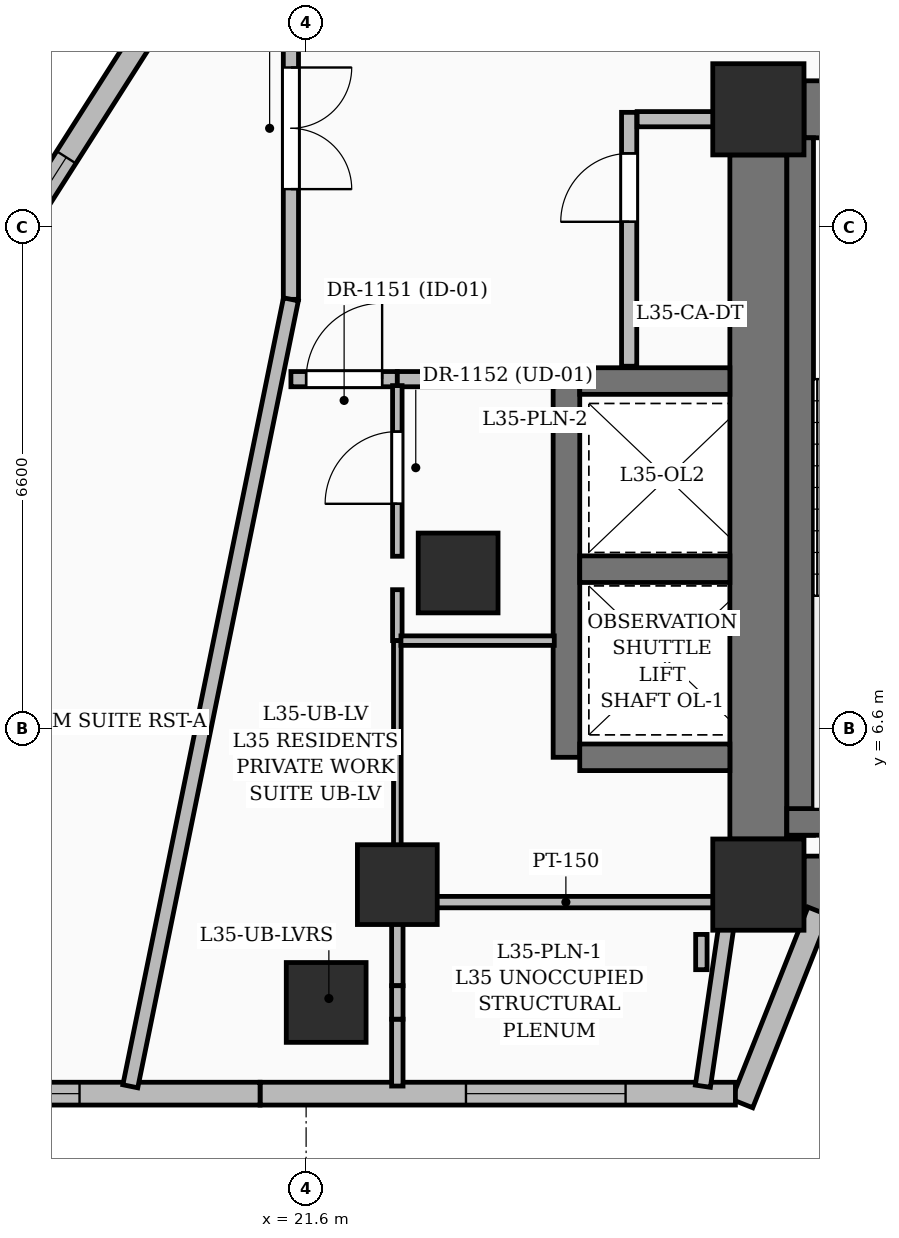
"""IFC4 building model, lengths in metres.
Left out: names, types, materials, properties, quantities, classifications, styles, units other than length and angle.
Written with IfcOpenShell. Run it as: python <this file> out.ifc"""

import sys

from ifc_helpers import new_model, si_unit, direction, frame, frame_2d, origin, origin_2d, place, context, subcontext, project, spatial, rectangle, extrude, element, fill, save


model = new_model("IFC4")
c1 = context("Model", 3, precision=1e-05, world=origin(), true_north=direction((0.0, 1.0)))
c2 = subcontext(c1, "Body", "Model", "MODEL_VIEW")
j1 = project(units=[si_unit("LENGTHUNIT", "METRE"), si_unit("PLANEANGLEUNIT", "RADIAN")], contexts=[c1])
p1 = place(None, origin())
s1 = spatial("IfcSite", under=j1, at=p1, CompositionType="ELEMENT")
p2 = place(p1, origin())
s2 = spatial("IfcBuilding", under=s1, at=p2, CompositionType="ELEMENT")
p3 = place(p2, frame((0.0, 0.0, 139.2)))
s3 = spatial("IfcBuildingStorey", under=s2, at=p3, CompositionType="ELEMENT", Elevation=139.2)
for number, where, z_axis, x_axis in (
    (1, (27.55, 4.55, 0.0), (0.0, 0.0, 1.0), (1.0, 0.0, 0.0)),
    (2, (27.55, 14.75, 0.0), (0.0, 0.0, 1.0), (1.0, 0.0, 0.0)),
):
    element("IfcColumn", number, at=place(p3, frame(where, z_axis=z_axis, x_axis=x_axis)), inside=s3, PredefinedType="COLUMN", context=c2, shape_type="SweptSolid", body=[
        extrude(rectangle(XDim=1.2, YDim=1.2, at=origin_2d()), origin(), (0.0, 0.0, 1.0), 3.6),
    ])
for number, where, z_axis, x_axis in (
    (3, (22.8, 4.55, 0.0), (0.0, 0.0, 1.0), (1.0, 0.0, 0.0)),
    (4, (23.6, 8.65, 0.0), (0.0, 0.0, 1.0), (1.0, 0.0, 0.0)),
):
    element("IfcColumn", number, at=place(p3, frame(where, z_axis=z_axis, x_axis=x_axis)), inside=s3, PredefinedType="COLUMN", context=c2, shape_type="SweptSolid", body=[
        extrude(rectangle(XDim=1.05, YDim=1.05, at=origin_2d()), origin(), (0.0, 0.0, 1.0), 3.6),
    ])
p4 = place(p3, frame((28.15, 4.55, 0.0), z_axis=(0.0, 0.0, 1.0), x_axis=(1.0, 0.0, 0.0)))
e5 = element("IfcWall", 5, at=p4, inside=s3, PredefinedType="SHEAR", context=c2, shape_type="SweptSolid", body=[
    extrude(rectangle(XDim=6.4, YDim=0.75, at=frame_2d((3.2, 0.0))), origin(), (0.0, 0.0, 1.0), 3.6),
])
p5 = place(p3, frame((28.15, 14.75, 0.0), z_axis=(0.0, 0.0, 1.0), x_axis=(1.0, 0.0, 0.0)))
e6 = element("IfcWall", 6, at=p5, inside=s3, PredefinedType="SHEAR", context=c2, shape_type="SweptSolid", body=[
    extrude(rectangle(XDim=6.4, YDim=0.75, at=frame_2d((3.2, 0.0))), origin(), (0.0, 0.0, 1.0), 3.6),
])
p6 = place(p5, frame((1.025, 0.0, 0.0)))
e7 = element("IfcOpeningElement", 7, at=p6, cuts=e6, PredefinedType="OPENING", context=c2, shape_type="SweptSolid", body=[
    extrude(rectangle(XDim=1.05, YDim=2.15, at=frame_2d((0.525, 1.075))), frame((0.0, 0.385, 0.0), z_axis=(0.0, -1.0, 0.0), x_axis=(1.0, 0.0, 0.0)), (0.0, 0.0, 1.0), 0.77),
])
p7 = place(p5, frame((3.8, 0.0, 0.0)))
e8 = element("IfcOpeningElement", 8, at=p7, cuts=e6, PredefinedType="OPENING", context=c2, shape_type="SweptSolid", body=[
    extrude(rectangle(XDim=1.1, YDim=2.2, at=frame_2d((0.55, 1.1))), frame((0.0, 0.385, 0.0), z_axis=(0.0, -1.0, 0.0), x_axis=(1.0, 0.0, 0.0)), (0.0, 0.0, 1.0), 0.77),
])
p8 = place(p3, frame((27.55, 5.15, 0.0), z_axis=(0.0, 0.0, 1.0), x_axis=(0.0, 1.0, 0.0)))
e9 = element("IfcWall", 9, at=p8, inside=s3, PredefinedType="SHEAR", context=c2, shape_type="SweptSolid", body=[
    extrude(rectangle(XDim=9.0, YDim=0.75, at=frame_2d((4.5, 0.0))), origin(), (0.0, 0.0, 1.0), 3.6),
])
p9 = place(p3, frame((28.1, 5.2, 0.0), z_axis=(0.0, 0.0, 1.0), x_axis=(0.0, 1.0, 0.0)))
e10 = element("IfcWall", 10, at=p9, inside=s3, PredefinedType="SOLIDWALL", context=c2, shape_type="SweptSolid", body=[
    extrude(rectangle(XDim=9.175, YDim=0.35, at=frame_2d((4.587, 0.0))), origin(), (0.0, 0.0, 1.0), 3.6),
])
p10 = place(p3, frame((27.925, 5.375, 0.0), z_axis=(0.0, 0.0, 1.0), x_axis=(1.0, 0.0, 0.0)))
e11 = element("IfcWall", 11, at=p10, inside=s3, PredefinedType="SOLIDWALL", context=c2, shape_type="SweptSolid", body=[
    extrude(rectangle(XDim=3.55, YDim=0.35, at=frame_2d((1.775, 0.0))), origin(), (0.0, 0.0, 1.0), 3.6),
])
p11 = place(p3, frame((25.025, 6.225, 0.0), z_axis=(0.0, 0.0, 1.0), x_axis=(0.0, 1.0, 0.0)))
e12 = element("IfcWall", 12, at=p11, inside=s3, PredefinedType="SOLIDWALL", context=c2, shape_type="SweptSolid", body=[
    extrude(rectangle(XDim=4.95, YDim=0.35, at=frame_2d((2.475, 0.0))), origin(), (0.0, 0.0, 1.0), 3.6),
])
for number, where, z_axis, x_axis in (
    (13, (25.2, 6.225, 0.0), (0.0, 0.0, 1.0), (1.0, 0.0, 0.0)),
    (14, (25.2, 8.7, 0.0), (0.0, 0.0, 1.0), (1.0, 0.0, 0.0)),
    (15, (25.2, 11.175, 0.0), (0.0, 0.0, 1.0), (1.0, 0.0, 0.0)),
):
    element("IfcWall", number, at=place(p3, frame(where, z_axis=z_axis, x_axis=x_axis)), inside=s3, PredefinedType="SOLIDWALL", context=c2, shape_type="SweptSolid", body=[
        extrude(rectangle(XDim=1.975, YDim=0.35, at=frame_2d((0.988, 0.0))), origin(), (0.0, 0.0, 1.0), 3.6),
    ])
p12 = place(p3, frame((21.864, 3.0, 0.0), z_axis=(0.0, 0.0, 1.0), x_axis=(1.0, 0.0, 0.0)))
e16 = element("IfcColumn", 16, at=p12, inside=s3, PredefinedType="COLUMN", context=c2, shape_type="SweptSolid", body=[
    extrude(rectangle(XDim=1.05, YDim=1.05, at=origin_2d()), origin(), (0.0, 0.0, 1.0), 3.6),
])
p13 = place(p3, frame((28.342, 4.199, 0.0), z_axis=(0.0, 0.0, 1.0), x_axis=(-0.36956502288, -0.929204871847, 0.0)))
e17 = element("IfcWall", 17, at=p13, inside=s3, PredefinedType="SOLIDWALL", context=c2, shape_type="SweptSolid", body=[
    extrude(rectangle(XDim=2.722, YDim=0.3, at=frame_2d((1.361, 0.0))), origin(), (0.0, 0.0, 1.0), 2.575),
])
p14 = place(p3, frame((27.248, 1.8, 0.0), z_axis=(0.0, 0.0, 1.0), x_axis=(-1.0, 0.0, 0.0)))
e18 = element("IfcWall", 18, at=p14, inside=s3, PredefinedType="SOLIDWALL", context=c2, shape_type="SweptSolid", body=[
    extrude(rectangle(XDim=6.254, YDim=0.3, at=frame_2d((3.127, 0.0))), origin(), (0.0, 0.0, 1.0), 3.35),
])
p15 = place(p14, frame((1.445, 0.0, 0.55)))
e19 = element("IfcOpeningElement", 19, at=p15, cuts=e18, PredefinedType="OPENING", context=c2, shape_type="SweptSolid", body=[
    extrude(rectangle(XDim=2.1, YDim=2.4, at=frame_2d((1.05, 1.2))), frame((0.0, 0.16, 0.0), z_axis=(0.0, -1.0, 0.0), x_axis=(1.0, 0.0, 0.0)), (0.0, 0.0, 1.0), 0.32),
])
p16 = place(p3, frame((20.994, 1.8, 0.0), z_axis=(0.0, 0.0, 1.0), x_axis=(-1.0, 0.0, 0.0)))
e20 = element("IfcWall", 20, at=p16, inside=s3, PredefinedType="SOLIDWALL", context=c2, shape_type="SweptSolid", body=[
    extrude(rectangle(XDim=6.534, YDim=0.3, at=frame_2d((3.267, 0.0))), origin(), (0.0, 0.0, 1.0), 3.35),
])
p17 = place(p16, frame((2.375, 0.0, 0.6)))
e21 = element("IfcOpeningElement", 21, at=p17, cuts=e20, PredefinedType="OPENING", context=c2, shape_type="SweptSolid", body=[
    extrude(rectangle(XDim=1.8, YDim=2.1, at=frame_2d((0.9, 1.05))), frame((0.0, 0.16, 0.0), z_axis=(0.0, -1.0, 0.0), x_axis=(1.0, 0.0, 0.0)), (0.0, 0.0, 1.0), 0.32),
])
p18 = place(p3, frame((16.202, 10.597, 0.0), z_axis=(0.0, 0.0, 1.0), x_axis=(0.537115953095, 0.843508419004, 0.0)))
e22 = element("IfcWall", 22, at=p18, inside=s3, PredefinedType="SOLIDWALL", context=c2, shape_type="SweptSolid", body=[
    extrude(rectangle(XDim=6.569, YDim=0.3, at=frame_2d((3.285, 0.0))), origin(), (0.0, 0.0, 1.0), 3.35),
])
p19 = place(p18, frame((2.375, 0.0, 0.6)))
e23 = element("IfcOpeningElement", 23, at=p19, cuts=e22, PredefinedType="OPENING", context=c2, shape_type="SweptSolid", body=[
    extrude(rectangle(XDim=1.8, YDim=2.1, at=frame_2d((0.9, 1.05))), frame((0.0, 0.16, 0.0), z_axis=(0.0, -1.0, 0.0), x_axis=(1.0, 0.0, 0.0)), (0.0, 0.0, 1.0), 0.32),
])
p20 = place(p3, frame((25.85, 11.37, 0.0), z_axis=(0.0, 0.0, 1.0), x_axis=(0.0, 1.0, 0.0)))
e24 = element("IfcWall", 24, at=p20, inside=s3, PredefinedType="PARTITIONING", context=c2, shape_type="SweptSolid", body=[
    extrude(rectangle(XDim=3.34, YDim=0.2, at=frame_2d((1.67, 0.0))), origin(), (0.0, 0.0, 1.0), 3.35),
])
p21 = place(p20, frame((1.9, 0.0, 0.0)))
e25 = element("IfcOpeningElement", 25, at=p21, cuts=e24, PredefinedType="OPENING", context=c2, shape_type="SweptSolid", body=[
    extrude(rectangle(XDim=0.9, YDim=2.1, at=frame_2d((0.45, 1.05))), frame((0.0, 0.11, 0.0), z_axis=(0.0, -1.0, 0.0), x_axis=(1.0, 0.0, 0.0)), (0.0, 0.0, 1.0), 0.22),
])
p22 = place(p3, frame((25.955, 14.62, 0.0), z_axis=(0.0, 0.0, 1.0), x_axis=(1.0, 0.0, 0.0)))
e26 = element("IfcWall", 26, at=p22, inside=s3, PredefinedType="PARTITIONING", context=c2, shape_type="SweptSolid", body=[
    extrude(rectangle(XDim=1.205, YDim=0.2, at=frame_2d((0.603, 0.0))), origin(), (0.0, 0.0, 1.0), 3.35),
])
p23 = place(p3, frame((21.4, 16.75, 0.0), z_axis=(0.0, 0.0, 1.0), x_axis=(0.0, -1.0, 0.0)))
e27 = element("IfcWall", 27, at=p23, inside=s3, PredefinedType="PARTITIONING", context=c2, shape_type="SweptSolid", body=[
    extrude(rectangle(XDim=4.5, YDim=0.2, at=frame_2d((2.25, 0.0))), origin(), (0.0, 0.0, 1.0), 2.57),
])
p24 = place(p23, frame((1.45, 0.0, 0.0)))
e28 = element("IfcOpeningElement", 28, at=p24, cuts=e27, PredefinedType="OPENING", context=c2, shape_type="SweptSolid", body=[
    extrude(rectangle(XDim=1.6, YDim=2.3, at=frame_2d((0.8, 1.15))), frame((0.0, 0.11, 0.0), z_axis=(0.0, -1.0, 0.0), x_axis=(1.0, 0.0, 0.0)), (0.0, 0.0, 1.0), 0.22),
])
p25 = place(p3, frame((21.4, 11.2, 0.0), z_axis=(0.0, 0.0, 1.0), x_axis=(1.0, 0.0, 0.0)))
e29 = element("IfcWall", 29, at=p25, inside=s3, PredefinedType="PARTITIONING", context=c2, shape_type="SweptSolid", body=[
    extrude(rectangle(XDim=1.4, YDim=0.2, at=frame_2d((0.7, 0.0))), origin(), (0.0, 0.0, 1.0), 2.712),
])
p26 = place(p25, frame((0.2, 0.0, 0.0)))
e30 = element("IfcOpeningElement", 30, at=p26, cuts=e29, PredefinedType="OPENING", context=c2, shape_type="SweptSolid", body=[
    extrude(rectangle(XDim=1.0, YDim=2.2, at=frame_2d((0.5, 1.1))), frame((0.0, 0.11, 0.0), z_axis=(0.0, -1.0, 0.0), x_axis=(1.0, 0.0, 0.0)), (0.0, 0.0, 1.0), 0.22),
])
p27 = place(p3, frame((22.8, 11.2, 0.0), z_axis=(0.0, 0.0, 1.0), x_axis=(1.0, 0.0, 0.0)))
e31 = element("IfcWall", 31, at=p27, inside=s3, PredefinedType="PARTITIONING", context=c2, shape_type="SweptSolid", body=[
    extrude(rectangle(XDim=2.069, YDim=0.2, at=frame_2d((1.035, 0.0))), origin(), (0.0, 0.0, 1.0), 3.35),
])
p28 = place(p3, frame((19.287, 1.897, 0.0), z_axis=(0.0, 0.0, 1.0), x_axis=(0.19995367442, 0.979805352142, 0.0)))
e32 = element("IfcWall", 32, at=p28, inside=s3, PredefinedType="PARTITIONING", context=c2, shape_type="SweptSolid", body=[
    extrude(rectangle(XDim=10.566, YDim=0.2, at=frame_2d((5.283, 0.0))), origin(), (0.0, 0.0, 1.0), 2.393),
])
p29 = place(p3, frame((22.8, 1.9, 0.0), z_axis=(0.0, 0.0, 1.0), x_axis=(0.0, 1.0, 0.0)))
e33 = element("IfcWall", 33, at=p29, inside=s3, PredefinedType="PARTITIONING", context=c2, shape_type="SweptSolid", body=[
    extrude(rectangle(XDim=0.88, YDim=0.15, at=frame_2d((0.44, 0.0))), origin(), (0.0, 0.0, 1.0), 2.57),
])
p30 = place(p3, frame((22.8, 3.22, 0.0), z_axis=(0.0, 0.0, 1.0), x_axis=(0.0, 1.0, 0.0)))
e34 = element("IfcWall", 34, at=p30, inside=s3, PredefinedType="PARTITIONING", context=c2, shape_type="SweptSolid", body=[
    extrude(rectangle(XDim=1.1, YDim=0.15, at=frame_2d((0.55, 0.0))), origin(), (0.0, 0.0, 1.0), 2.57),
])
p31 = place(p3, frame((22.8, 7.76, 0.0), z_axis=(0.0, 0.0, 1.0), x_axis=(0.0, 1.0, 0.0)))
e35 = element("IfcWall", 35, at=p31, inside=s3, PredefinedType="PARTITIONING", context=c2, shape_type="SweptSolid", body=[
    extrude(rectangle(XDim=0.67, YDim=0.125, at=frame_2d((0.335, 0.0))), origin(), (0.0, 0.0, 1.0), 3.35),
])
p32 = place(p3, frame((22.8, 8.87, 0.0), z_axis=(0.0, 0.0, 1.0), x_axis=(0.0, 1.0, 0.0)))
e36 = element("IfcWall", 36, at=p32, inside=s3, PredefinedType="PARTITIONING", context=c2, shape_type="SweptSolid", body=[
    extrude(rectangle(XDim=2.245, YDim=0.125, at=frame_2d((1.123, 0.0))), origin(), (0.0, 0.0, 1.0), 2.393),
])
p33 = place(p32, frame((0.69, 0.0, 0.0)))
e37 = element("IfcOpeningElement", 37, at=p33, cuts=e36, PredefinedType="OPENING", context=c2, shape_type="SweptSolid", body=[
    extrude(rectangle(XDim=0.95, YDim=2.2, at=frame_2d((0.475, 1.1))), frame((0.0, 0.072, 0.0), z_axis=(0.0, -1.0, 0.0), x_axis=(1.0, 0.0, 0.0)), (0.0, 0.0, 1.0), 0.145),
])
p34 = place(p3, frame((22.8, 4.32, 0.0), z_axis=(0.0, 0.0, 1.0), x_axis=(0.0, 1.0, 0.0)))
e38 = element("IfcWall", 38, at=p34, inside=s3, PredefinedType="PARTITIONING", context=c2, shape_type="SweptSolid", body=[
    extrude(rectangle(XDim=3.44, YDim=0.1, at=frame_2d((1.72, 0.0))), origin(), (0.0, 0.0, 1.0), 3.35),
])
p35 = place(p3, frame((27.175, 4.32, 0.0), z_axis=(0.0, 0.0, 1.0), x_axis=(-1.0, 0.0, 0.0)))
e39 = element("IfcWall", 39, at=p35, inside=s3, PredefinedType="PARTITIONING", context=c2, shape_type="SweptSolid", body=[
    extrude(rectangle(XDim=4.315, YDim=0.15, at=frame_2d((2.157, 0.0))), origin(), (0.0, 0.0, 1.0), 2.436),
])
p36 = place(p3, frame((26.82, 1.898, 0.0), z_axis=(0.0, 0.0, 1.0), x_axis=(0.144970066801, 0.989436041254, 0.0)))
e40 = element("IfcWall", 40, at=p36, inside=s3, PredefinedType="PARTITIONING", context=c2, shape_type="SweptSolid", body=[
    extrude(rectangle(XDim=2.388, YDim=0.2, at=frame_2d((1.194, 0.0))), origin(), (0.0, 0.0, 1.0), 2.57),
])
p37 = place(p3, frame((22.847, 7.76, 0.0), z_axis=(0.0, 0.0, 1.0), x_axis=(1.0, 0.0, 0.0)))
e41 = element("IfcWall", 41, at=p37, inside=s3, PredefinedType="PARTITIONING", context=c2, shape_type="SweptSolid", body=[
    extrude(rectangle(XDim=2.018, YDim=0.125, at=frame_2d((1.009, 0.0))), origin(), (0.0, 0.0, 1.0), 3.35),
])
p38 = place(p3, frame((22.8, 3.22, 0.0), z_axis=(0.0, 0.0, 1.0), x_axis=(0.0, -1.0, 0.0)))
e42 = element("IfcWall", 42, at=p38, inside=s3, PredefinedType="PARTITIONING", context=c2, shape_type="SweptSolid", body=[
    extrude(rectangle(XDim=0.44, YDim=0.15, at=frame_2d((0.22, 0.0))), origin(), (0.0, 0.0, 1.0), 2.57),
])
p39 = place(p3, frame((26.8, 3.431, 0.0), z_axis=(0.0, 0.0, 1.0), x_axis=(0.0, 1.0, 0.0)))
e43 = element("IfcWall", 43, at=p39, inside=s3, PredefinedType="PARTITIONING", context=c2, shape_type="SweptSolid", body=[
    extrude(rectangle(XDim=0.464, YDim=0.15, at=frame_2d((0.232, 0.0))), origin(), (0.0, 0.0, 1.0), 3.35),
])
p40 = place(p15, origin())
e44 = element("IfcWindow", 44, at=p40, inside=s3, PartitioningType="SINGLE_PANEL", PredefinedType="WINDOW", context=c2, shape_type="SweptSolid", body=[
    extrude(rectangle(XDim=2.1, YDim=2.4, at=frame_2d((1.05, 1.2))), frame((0.0, 0.03, 0.0), z_axis=(0.0, -1.0, 0.0), x_axis=(1.0, 0.0, 0.0)), (0.0, 0.0, 1.0), 0.06),
])
fill(e19, e44)
p41 = place(p17, origin())
e45 = element("IfcWindow", 45, at=p41, inside=s3, PartitioningType="SINGLE_PANEL", PredefinedType="WINDOW", context=c2, shape_type="SweptSolid", body=[
    extrude(rectangle(XDim=1.8, YDim=2.1, at=frame_2d((0.9, 1.05))), frame((0.0, 0.03, 0.0), z_axis=(0.0, -1.0, 0.0), x_axis=(1.0, 0.0, 0.0)), (0.0, 0.0, 1.0), 0.06),
])
fill(e21, e45)
p42 = place(p19, origin())
e46 = element("IfcWindow", 46, at=p42, inside=s3, PartitioningType="SINGLE_PANEL", PredefinedType="WINDOW", context=c2, shape_type="SweptSolid", body=[
    extrude(rectangle(XDim=1.8, YDim=2.1, at=frame_2d((0.9, 1.05))), frame((0.0, 0.03, 0.0), z_axis=(0.0, -1.0, 0.0), x_axis=(1.0, 0.0, 0.0)), (0.0, 0.0, 1.0), 0.06),
])
fill(e23, e46)
p43 = place(p21, origin())
e47 = element("IfcDoor", 47, at=p43, inside=s3, OperationType="SINGLE_SWING_LEFT", PredefinedType="DOOR", context=c2, shape_type="SweptSolid", body=[
    extrude(rectangle(XDim=0.9, YDim=2.1, at=frame_2d((0.45, 1.05))), frame((0.0, 0.025, 0.0), z_axis=(0.0, -1.0, 0.0), x_axis=(1.0, 0.0, 0.0)), (0.0, 0.0, 1.0), 0.05),
])
fill(e25, e47)
p44 = place(p24, origin())
e48 = element("IfcDoor", 48, at=p44, inside=s3, OperationType="DOUBLE_DOOR_SINGLE_SWING", PredefinedType="DOOR", context=c2, shape_type="SweptSolid", body=[
    extrude(rectangle(XDim=1.6, YDim=2.3, at=frame_2d((0.8, 1.15))), frame((0.0, 0.025, 0.0), z_axis=(0.0, -1.0, 0.0), x_axis=(1.0, 0.0, 0.0)), (0.0, 0.0, 1.0), 0.05),
])
fill(e28, e48)
p45 = place(p26, origin())
e49 = element("IfcDoor", 49, at=p45, inside=s3, OperationType="SINGLE_SWING_RIGHT", PredefinedType="DOOR", context=c2, shape_type="SweptSolid", body=[
    extrude(rectangle(XDim=1.0, YDim=2.2, at=frame_2d((0.5, 1.1))), frame((0.0, 0.025, 0.0), z_axis=(0.0, -1.0, 0.0), x_axis=(1.0, 0.0, 0.0)), (0.0, 0.0, 1.0), 0.05),
])
fill(e30, e49)
p46 = place(p33, origin())
e50 = element("IfcDoor", 50, at=p46, inside=s3, OperationType="SINGLE_SWING_LEFT", PredefinedType="DOOR", context=c2, shape_type="SweptSolid", body=[
    extrude(rectangle(XDim=0.95, YDim=2.2, at=frame_2d((0.475, 1.1))), frame((0.0, 0.025, 0.0), z_axis=(0.0, -1.0, 0.0), x_axis=(1.0, 0.0, 0.0)), (0.0, 0.0, 1.0), 0.05),
])
fill(e37, e50)
save(model, sys.argv[1])
